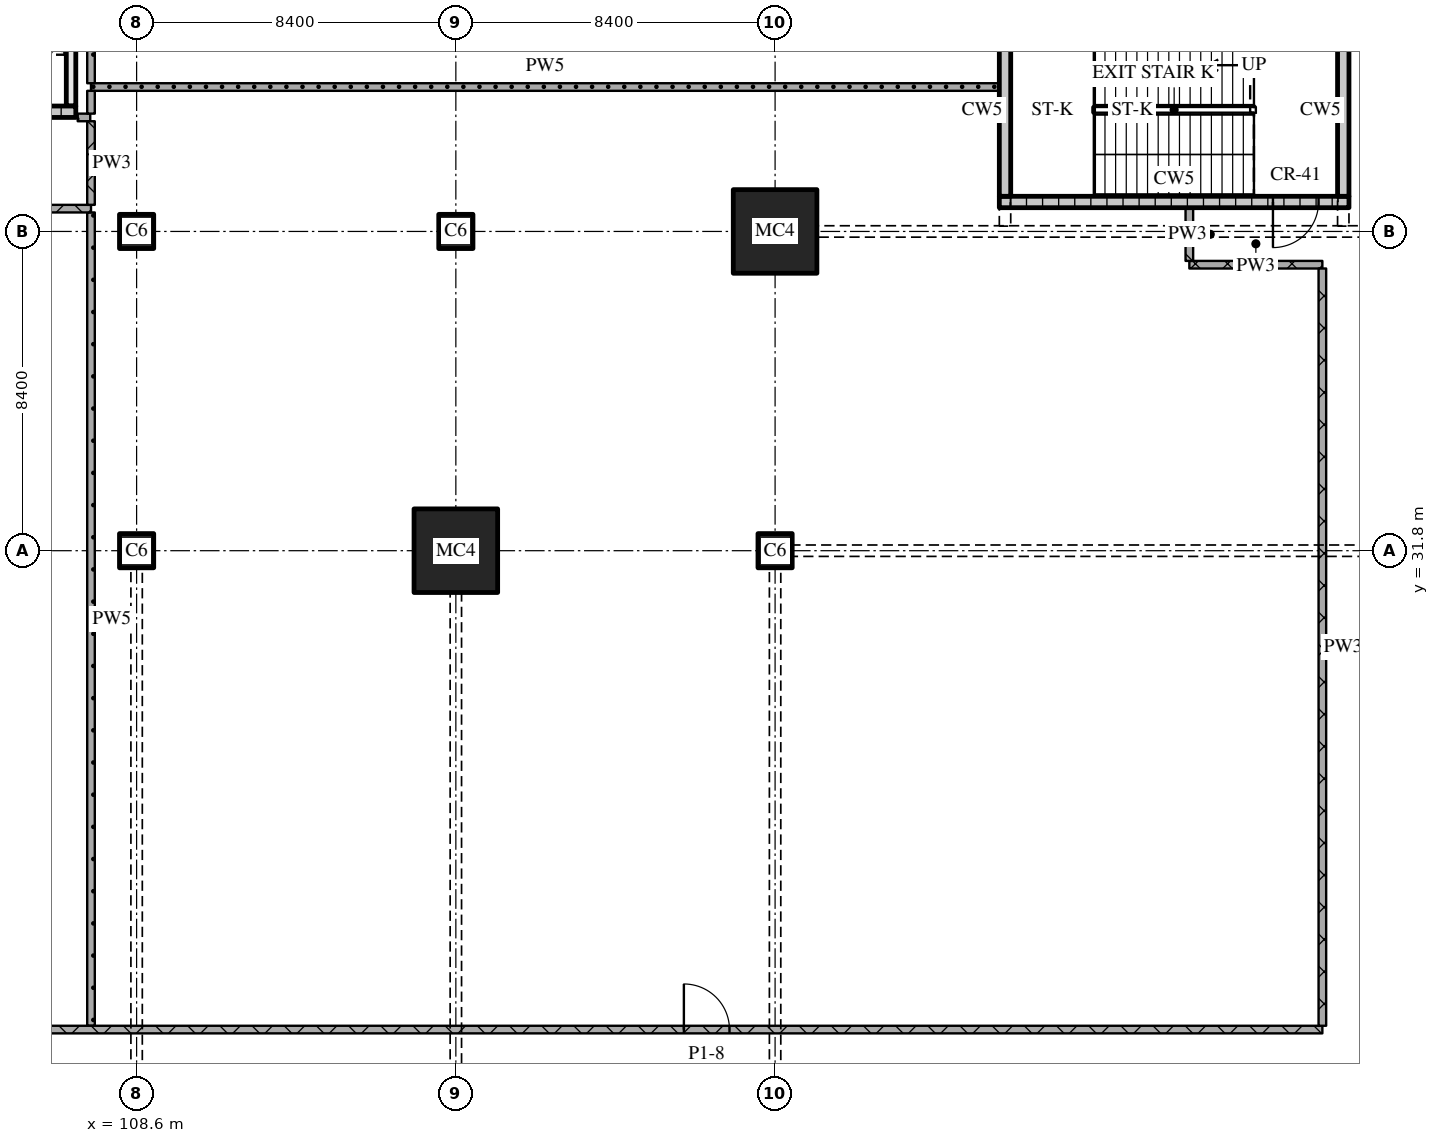
"""IFC4 building model, lengths in metres.
Left out: names, types, materials, properties, quantities, classifications, styles, units other than length and angle.
Written with IfcOpenShell. Run it as: python <this file> out.ifc"""

import sys

from ifc_helpers import new_model, si_unit, direction, frame, frame_2d, origin, origin_2d, place, context, subcontext, project, spatial, rectangle, extrude, element, fill, save


model = new_model("IFC4")
c1 = context("Model", 3, precision=1e-05, world=origin(), true_north=direction((0.0, 1.0)))
c2 = subcontext(c1, "Body", "Model", "MODEL_VIEW")
j1 = project(units=[si_unit("LENGTHUNIT", "METRE"), si_unit("PLANEANGLEUNIT", "RADIAN")], contexts=[c1])
p1 = place(None, origin())
s1 = spatial("IfcSite", under=j1, at=p1, CompositionType="ELEMENT")
p2 = place(p1, origin())
s2 = spatial("IfcBuilding", under=s1, at=p2, CompositionType="ELEMENT")
p3 = place(p2, frame((0.0, 0.0, 9.0)))
s3 = spatial("IfcBuildingStorey", under=s2, at=p3, CompositionType="ELEMENT", Elevation=9.0)
for number, where, z_axis, x_axis in (
    (1, (108.6, 31.8, 0.0), (0.0, 0.0, 1.0), (1.0, 0.0, 0.0)),
    (2, (108.6, 40.2, 0.0), (0.0, 0.0, 1.0), (1.0, 0.0, 0.0)),
):
    element("IfcColumn", number, at=place(p3, frame(where, z_axis=z_axis, x_axis=x_axis)), inside=s3, PredefinedType="COLUMN", context=c2, shape_type="SweptSolid", body=[
        extrude(rectangle(XDim=0.9, YDim=0.9, at=origin_2d()), origin(), (0.0, 0.0, 1.0), 5.4),
    ])
p4 = place(p3, frame((117.0, 31.8, 0.0), z_axis=(0.0, 0.0, 1.0), x_axis=(1.0, 0.0, 0.0)))
e3 = element("IfcColumn", 3, at=p4, inside=s3, PredefinedType="COLUMN", context=c2, shape_type="SweptSolid", body=[
    extrude(rectangle(XDim=2.2, YDim=2.2, at=origin_2d()), origin(), (0.0, 0.0, 1.0), 5.4),
])
for number, where, z_axis, x_axis in (
    (4, (117.0, 40.2, 0.0), (0.0, 0.0, 1.0), (1.0, 0.0, 0.0)),
    (5, (125.4, 31.8, 0.0), (0.0, 0.0, 1.0), (1.0, 0.0, 0.0)),
):
    element("IfcColumn", number, at=place(p3, frame(where, z_axis=z_axis, x_axis=x_axis)), inside=s3, PredefinedType="COLUMN", context=c2, shape_type="SweptSolid", body=[
        extrude(rectangle(XDim=0.9, YDim=0.9, at=origin_2d()), origin(), (0.0, 0.0, 1.0), 5.4),
    ])
p5 = place(p3, frame((125.4, 40.2, 0.0), z_axis=(0.0, 0.0, 1.0), x_axis=(1.0, 0.0, 0.0)))
e6 = element("IfcColumn", 6, at=p5, inside=s3, PredefinedType="COLUMN", context=c2, shape_type="SweptSolid", body=[
    extrude(rectangle(XDim=2.2, YDim=2.2, at=origin_2d()), origin(), (0.0, 0.0, 1.0), 5.4),
])
p6 = place(p3, frame((101.4, 43.35, 0.0), z_axis=(0.0, 0.0, 1.0), x_axis=(1.0, 0.0, 0.0)))
e7 = element("IfcWall", 7, at=p6, inside=s3, PredefinedType="SOLIDWALL", context=c2, shape_type="SweptSolid", body=[
    extrude(rectangle(XDim=5.6, YDim=0.3, at=frame_2d((2.8, 0.0))), origin(), (0.0, 0.0, 1.0), 5.1),
])
p7 = place(p6, frame((0.725, 0.0, 0.0)))
e8 = element("IfcOpeningElement", 8, at=p7, cuts=e7, PredefinedType="OPENING", context=c2, shape_type="SweptSolid", body=[
    extrude(rectangle(XDim=1.0, YDim=2.1, at=frame_2d((0.5, 1.05))), frame((0.0, 0.16, 0.0), z_axis=(0.0, -1.0, 0.0), x_axis=(1.0, 0.0, 0.0)), (0.0, 0.0, 1.0), 0.32),
])
p8 = place(p3, frame((106.875, 43.5, 0.0), z_axis=(0.0, 0.0, 1.0), x_axis=(0.0, 1.0, 0.0)))
e9 = element("IfcWall", 9, at=p8, inside=s3, PredefinedType="SOLIDWALL", context=c2, shape_type="SweptSolid", body=[
    extrude(rectangle(XDim=6.9, YDim=0.25, at=frame_2d((3.45, 0.0))), origin(), (0.0, 0.0, 1.0), 5.1),
])
p9 = place(p3, frame((131.3, 40.975, 0.0), z_axis=(0.0, 0.0, 1.0), x_axis=(1.0, 0.0, 0.0)))
e10 = element("IfcWall", 10, at=p9, inside=s3, PredefinedType="SOLIDWALL", context=c2, shape_type="SweptSolid", body=[
    extrude(rectangle(XDim=9.2, YDim=0.3, at=frame_2d((4.6, 0.0))), origin(), (0.0, 0.0, 1.0), 5.1),
])
p10 = place(p9, frame((7.2, 0.0, 0.0)))
e11 = element("IfcOpeningElement", 11, at=p10, cuts=e10, PredefinedType="OPENING", context=c2, shape_type="SweptSolid", body=[
    extrude(rectangle(XDim=1.2, YDim=2.1, at=frame_2d((0.6, 1.05))), frame((0.0, 0.16, 0.0), z_axis=(0.0, -1.0, 0.0), x_axis=(1.0, 0.0, 0.0)), (0.0, 0.0, 1.0), 0.32),
])
for number, where, z_axis, x_axis in (
    (12, (131.45, 41.125, 0.0), (0.0, 0.0, 1.0), (0.0, 1.0, 0.0)),
    (13, (140.35, 41.125, 0.0), (0.0, 0.0, 1.0), (0.0, 1.0, 0.0)),
):
    element("IfcWall", number, at=place(p3, frame(where, z_axis=z_axis, x_axis=x_axis)), inside=s3, PredefinedType="SOLIDWALL", context=c2, shape_type="SweptSolid", body=[
        extrude(rectangle(XDim=4.55, YDim=0.3, at=frame_2d((2.275, 0.0))), origin(), (0.0, 0.0, 1.0), 5.1),
    ])
p11 = place(p3, frame((35.4, 19.2, 0.0), z_axis=(0.0, 0.0, 1.0), x_axis=(1.0, 0.0, 0.0)))
e14 = element("IfcWall", 14, at=p11, inside=s3, PredefinedType="PARTITIONING", context=c2, shape_type="SweptSolid", body=[
    extrude(rectangle(XDim=104.4, YDim=0.2, at=frame_2d((52.2, 0.0))), origin(), (0.0, 0.0, 1.0), 5.1),
])
p12 = place(p11, frame((66.0, 0.0, 0.0)))
e15 = element("IfcOpeningElement", 15, at=p12, cuts=e14, PredefinedType="OPENING", context=c2, shape_type="SweptSolid", body=[
    extrude(rectangle(XDim=1.2, YDim=2.1, at=frame_2d((0.6, 1.05))), frame((0.0, 0.11, 0.0), z_axis=(0.0, -1.0, 0.0), x_axis=(1.0, 0.0, 0.0)), (0.0, 0.0, 1.0), 0.22),
])
p13 = place(p11, frame((87.6, 0.0, 0.0)))
e16 = element("IfcOpeningElement", 16, at=p13, cuts=e14, PredefinedType="OPENING", context=c2, shape_type="SweptSolid", body=[
    extrude(rectangle(XDim=1.2, YDim=2.1, at=frame_2d((0.6, 1.05))), frame((0.0, 0.11, 0.0), z_axis=(0.0, -1.0, 0.0), x_axis=(1.0, 0.0, 0.0)), (0.0, 0.0, 1.0), 0.22),
])
p14 = place(p3, frame((136.3, 39.325, 0.0), z_axis=(0.0, 0.0, 1.0), x_axis=(1.0, 0.0, 0.0)))
e17 = element("IfcWall", 17, at=p14, inside=s3, PredefinedType="PARTITIONING", context=c2, shape_type="SweptSolid", body=[
    extrude(rectangle(XDim=3.5, YDim=0.2, at=frame_2d((1.75, 0.0))), origin(), (0.0, 0.0, 1.0), 5.1),
])
p15 = place(p3, frame((100.2, 40.8, 0.0), z_axis=(0.0, 0.0, 1.0), x_axis=(1.0, 0.0, 0.0)))
e18 = element("IfcWall", 18, at=p15, inside=s3, PredefinedType="PARTITIONING", context=c2, shape_type="SweptSolid", body=[
    extrude(rectangle(XDim=7.2, YDim=0.2, at=frame_2d((3.6, 0.0))), origin(), (0.0, 0.0, 1.0), 5.1),
])
p16 = place(p3, frame((107.05, 43.2, 0.0), z_axis=(0.0, 0.0, 1.0), x_axis=(1.0, 0.0, 0.0)))
e19 = element("IfcWall", 19, at=p16, inside=s3, PredefinedType="PARTITIONING", context=c2, shape_type="SweptSolid", body=[
    extrude(rectangle(XDim=0.33, YDim=0.2, at=frame_2d((0.165, 0.0))), origin(), (0.0, 0.0, 1.0), 5.1),
])
p17 = place(p3, frame((107.4, 44.0, 0.0), z_axis=(0.0, 0.0, 1.0), x_axis=(1.0, 0.0, 0.0)))
e20 = element("IfcWall", 20, at=p17, inside=s3, PredefinedType="PARTITIONING", context=c2, shape_type="SweptSolid", body=[
    extrude(rectangle(XDim=23.9, YDim=0.2, at=frame_2d((11.95, 0.0))), origin(), (0.0, 0.0, 1.0), 5.1),
])
p18 = place(p3, frame((107.4, 43.1, 0.0), z_axis=(0.0, 0.0, 1.0), x_axis=(0.0, -1.0, 0.0)))
e21 = element("IfcWall", 21, at=p18, inside=s3, PredefinedType="PARTITIONING", context=c2, shape_type="SweptSolid", body=[
    extrude(rectangle(XDim=2.2, YDim=0.2, at=frame_2d((1.1, 0.0))), origin(), (0.0, 0.0, 1.0), 5.1),
])
p19 = place(p3, frame((107.4, 43.9, 0.0), z_axis=(0.0, 0.0, 1.0), x_axis=(0.0, -1.0, 0.0)))
e22 = element("IfcWall", 22, at=p19, inside=s3, PredefinedType="PARTITIONING", context=c2, shape_type="SweptSolid", body=[
    extrude(rectangle(XDim=0.6, YDim=0.2, at=frame_2d((0.3, 0.0))), origin(), (0.0, 0.0, 1.0), 5.1),
])
p20 = place(p3, frame((107.4, 50.6, 0.0), z_axis=(0.0, 0.0, 1.0), x_axis=(0.0, -1.0, 0.0)))
e23 = element("IfcWall", 23, at=p20, inside=s3, PredefinedType="PARTITIONING", context=c2, shape_type="SweptSolid", body=[
    extrude(rectangle(XDim=6.5, YDim=0.2, at=frame_2d((3.25, 0.0))), origin(), (0.0, 0.0, 1.0), 5.1),
])
p21 = place(p3, frame((107.4, 40.7, 0.0), z_axis=(0.0, 0.0, 1.0), x_axis=(0.0, -1.0, 0.0)))
e24 = element("IfcWall", 24, at=p21, inside=s3, PredefinedType="PARTITIONING", context=c2, shape_type="SweptSolid", body=[
    extrude(rectangle(XDim=21.4, YDim=0.2, at=frame_2d((10.7, 0.0))), origin(), (0.0, 0.0, 1.0), 5.1),
])
p22 = place(p3, frame((136.3, 40.825, 0.0), z_axis=(0.0, 0.0, 1.0), x_axis=(0.0, -1.0, 0.0)))
e25 = element("IfcWall", 25, at=p22, inside=s3, PredefinedType="PARTITIONING", context=c2, shape_type="SweptSolid", body=[
    extrude(rectangle(XDim=1.4, YDim=0.2, at=frame_2d((0.7, 0.0))), origin(), (0.0, 0.0, 1.0), 5.1),
])
p23 = place(p3, frame((139.8, 39.225, 0.0), z_axis=(0.0, 0.0, 1.0), x_axis=(0.0, -1.0, 0.0)))
e26 = element("IfcWall", 26, at=p23, inside=s3, PredefinedType="PARTITIONING", context=c2, shape_type="SweptSolid", body=[
    extrude(rectangle(XDim=19.925, YDim=0.2, at=frame_2d((9.962, 0.0))), origin(), (0.0, 0.0, 1.0), 5.1),
])
p24 = place(p10, origin())
e27 = element("IfcDoor", 27, at=p24, inside=s3, OperationType="SINGLE_SWING_RIGHT", PredefinedType="DOOR", context=c2, shape_type="SweptSolid", body=[
    extrude(rectangle(XDim=1.2, YDim=2.1, at=frame_2d((0.6, 1.05))), frame((0.0, 0.025, 0.0), z_axis=(0.0, -1.0, 0.0), x_axis=(1.0, 0.0, 0.0)), (0.0, 0.0, 1.0), 0.05),
])
fill(e11, e27)
p25 = place(p13, origin())
e28 = element("IfcDoor", 28, at=p25, inside=s3, OperationType="SINGLE_SWING_LEFT", PredefinedType="DOOR", context=c2, shape_type="SweptSolid", body=[
    extrude(rectangle(XDim=1.2, YDim=2.1, at=frame_2d((0.6, 1.05))), frame((0.0, 0.025, 0.0), z_axis=(0.0, -1.0, 0.0), x_axis=(1.0, 0.0, 0.0)), (0.0, 0.0, 1.0), 0.05),
])
fill(e16, e28)
save(model, sys.argv[1])
